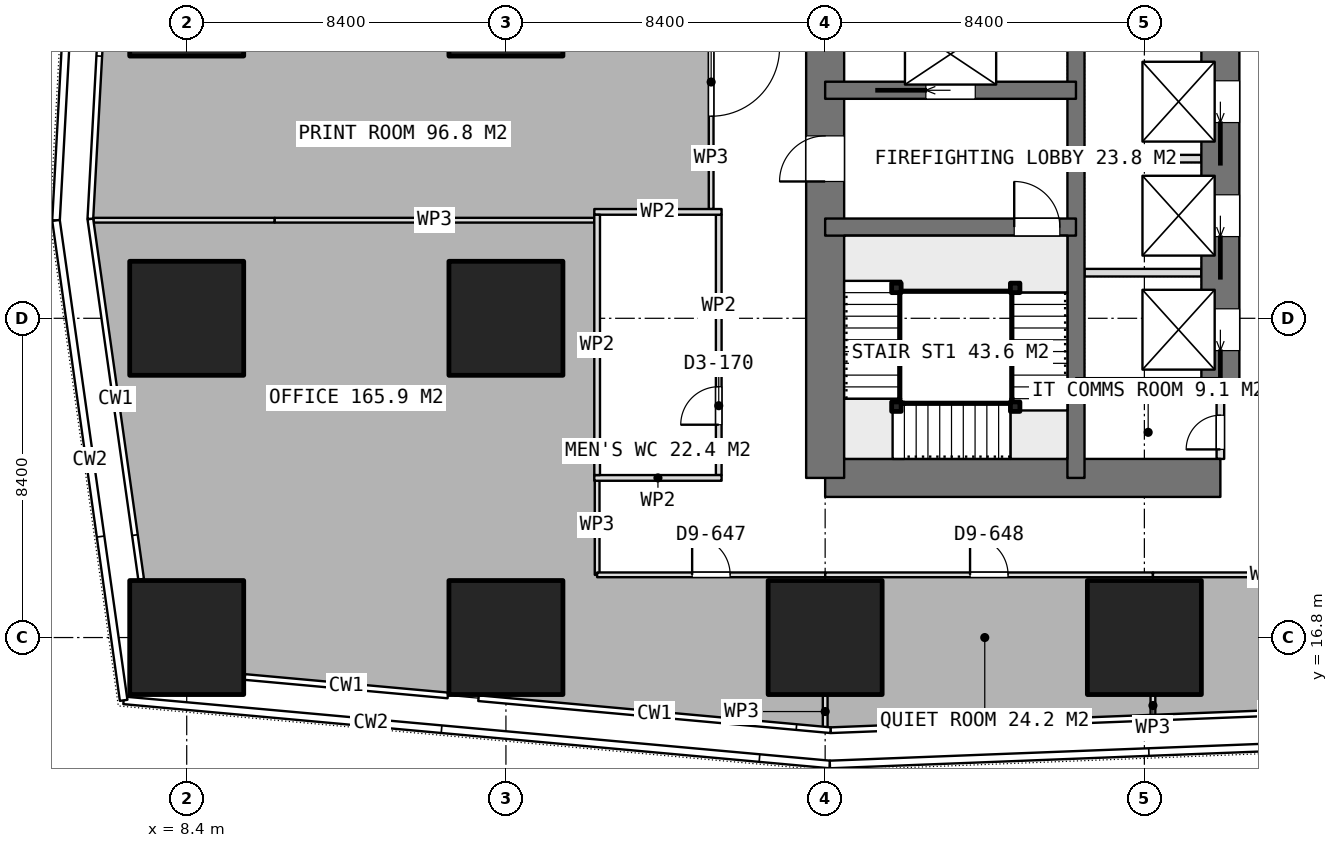
"""IFC4 building model, lengths in metres.
Left out: names, types, materials, properties, quantities, classifications, styles, units other than length and angle.
Written with IfcOpenShell. Run it as: python <this file> out.ifc"""

import sys

from ifc_helpers import new_model, si_unit, direction, frame, frame_2d, origin, origin_2d, place, context, subcontext, project, spatial, rectangle, extrude, element, fill, save


model = new_model("IFC4")
c1 = context("Model", 3, precision=1e-05, world=origin(), true_north=direction((0.0, 1.0)))
c2 = subcontext(c1, "Body", "Model", "MODEL_VIEW")
j1 = project(units=[si_unit("LENGTHUNIT", "METRE"), si_unit("PLANEANGLEUNIT", "RADIAN")], contexts=[c1])
p1 = place(None, origin())
s1 = spatial("IfcSite", under=j1, at=p1, CompositionType="ELEMENT")
p2 = place(p1, origin())
s2 = spatial("IfcBuilding", under=s1, at=p2, CompositionType="ELEMENT")
p3 = place(p2, frame((0.0, 0.0, 159.05)))
s3 = spatial("IfcBuildingStorey", under=s2, at=p3, CompositionType="ELEMENT", Elevation=159.05)
p4 = place(p3, frame((25.2, 21.0, 0.0), z_axis=(0.0, 0.0, 1.0), x_axis=(1.0, 0.0, 0.0)))
e1 = element("IfcWall", 1, at=p4, inside=s3, PredefinedType="SHEAR", context=c2, shape_type="SweptSolid", body=[
    extrude(rectangle(XDim=10.4, YDim=1.0, at=frame_2d((5.2, 0.0))), origin(), (0.0, 0.0, 1.0), 3.75),
])
p5 = place(p3, frame((25.2, 21.0, 0.0), z_axis=(0.0, 0.0, 1.0), x_axis=(0.0, 1.0, 0.0)))
e2 = element("IfcWall", 2, at=p5, inside=s3, PredefinedType="SHEAR", context=c2, shape_type="SweptSolid", body=[
    extrude(rectangle(XDim=25.2, YDim=1.0, at=frame_2d((12.6, 0.0))), origin(), (0.0, 0.0, 1.0), 3.75),
])
p6 = place(p5, frame((7.8, 0.0, 0.0)))
e3 = element("IfcOpeningElement", 3, at=p6, cuts=e2, PredefinedType="OPENING", context=c2, shape_type="SweptSolid", body=[
    extrude(rectangle(XDim=1.2, YDim=2.1, at=frame_2d((0.6, 1.05))), frame((0.0, 0.51, 0.0), z_axis=(0.0, -1.0, 0.0), x_axis=(1.0, 0.0, 0.0)), (0.0, 0.0, 1.0), 1.02),
])
p7 = place(p5, frame((14.25, 0.0, 0.0)))
e4 = element("IfcOpeningElement", 4, at=p7, cuts=e2, PredefinedType="OPENING", context=c2, shape_type="SweptSolid", body=[
    extrude(rectangle(XDim=0.9, YDim=2.1, at=frame_2d((0.45, 1.05))), frame((0.0, 0.51, 0.0), z_axis=(0.0, -1.0, 0.0), x_axis=(1.0, 0.0, 0.0)), (0.0, 0.0, 1.0), 1.02),
])
p8 = place(p5, frame((16.85, 0.0, 0.0)))
e5 = element("IfcOpeningElement", 5, at=p8, cuts=e2, PredefinedType="OPENING", context=c2, shape_type="SweptSolid", body=[
    extrude(rectangle(XDim=0.9, YDim=2.1, at=frame_2d((0.45, 1.05))), frame((0.0, 0.51, 0.0), z_axis=(0.0, -1.0, 0.0), x_axis=(1.0, 0.0, 0.0)), (0.0, 0.0, 1.0), 1.02),
])
p9 = place(p5, frame((19.025, 0.0, 0.0)))
e6 = element("IfcOpeningElement", 6, at=p9, cuts=e2, PredefinedType="OPENING", context=c2, shape_type="SweptSolid", body=[
    extrude(rectangle(XDim=1.2, YDim=2.1, at=frame_2d((0.6, 1.05))), frame((0.0, 0.51, 0.0), z_axis=(0.0, -1.0, 0.0), x_axis=(1.0, 0.0, 0.0)), (0.0, 0.0, 1.0), 1.02),
])
p10 = place(p3, frame((31.8, 21.0, 0.0), z_axis=(0.0, 0.0, 1.0), x_axis=(0.0, 1.0, 0.0)))
e7 = element("IfcWall", 7, at=p10, inside=s3, PredefinedType="SHEAR", context=c2, shape_type="SweptSolid", body=[
    extrude(rectangle(XDim=25.2, YDim=0.45, at=frame_2d((12.6, 0.0))), origin(), (0.0, 0.0, 1.0), 3.75),
])
p11 = place(p3, frame((35.6, 23.4, 0.0), z_axis=(0.0, 0.0, 1.0), x_axis=(0.0, 1.0, 0.0)))
e8 = element("IfcWall", 8, at=p11, inside=s3, PredefinedType="SHEAR", context=c2, shape_type="SweptSolid", body=[
    extrude(rectangle(XDim=18.0, YDim=1.0, at=frame_2d((9.0, 0.0))), origin(), (0.0, 0.0, 1.0), 3.75),
])
p12 = place(p11, frame((0.95, 0.0, 0.0)))
e9 = element("IfcOpeningElement", 9, at=p12, cuts=e8, PredefinedType="OPENING", context=c2, shape_type="SweptSolid", body=[
    extrude(rectangle(XDim=1.1, YDim=2.1, at=frame_2d((0.55, 1.05))), frame((0.0, 0.51, 0.0), z_axis=(0.0, -1.0, 0.0), x_axis=(1.0, 0.0, 0.0)), (0.0, 0.0, 1.0), 1.02),
])
p13 = place(p11, frame((3.95, 0.0, 0.0)))
e10 = element("IfcOpeningElement", 10, at=p13, cuts=e8, PredefinedType="OPENING", context=c2, shape_type="SweptSolid", body=[
    extrude(rectangle(XDim=1.1, YDim=2.1, at=frame_2d((0.55, 1.05))), frame((0.0, 0.51, 0.0), z_axis=(0.0, -1.0, 0.0), x_axis=(1.0, 0.0, 0.0)), (0.0, 0.0, 1.0), 1.02),
])
p14 = place(p11, frame((6.95, 0.0, 0.0)))
e11 = element("IfcOpeningElement", 11, at=p14, cuts=e8, PredefinedType="OPENING", context=c2, shape_type="SweptSolid", body=[
    extrude(rectangle(XDim=1.1, YDim=2.1, at=frame_2d((0.55, 1.05))), frame((0.0, 0.51, 0.0), z_axis=(0.0, -1.0, 0.0), x_axis=(1.0, 0.0, 0.0)), (0.0, 0.0, 1.0), 1.02),
])
p15 = place(p11, frame((9.95, 0.0, 0.0)))
e12 = element("IfcOpeningElement", 12, at=p15, cuts=e8, PredefinedType="OPENING", context=c2, shape_type="SweptSolid", body=[
    extrude(rectangle(XDim=1.1, YDim=2.1, at=frame_2d((0.55, 1.05))), frame((0.0, 0.51, 0.0), z_axis=(0.0, -1.0, 0.0), x_axis=(1.0, 0.0, 0.0)), (0.0, 0.0, 1.0), 1.02),
])
p16 = place(p11, frame((12.95, 0.0, 0.0)))
e13 = element("IfcOpeningElement", 13, at=p16, cuts=e8, PredefinedType="OPENING", context=c2, shape_type="SweptSolid", body=[
    extrude(rectangle(XDim=1.1, YDim=2.1, at=frame_2d((0.55, 1.05))), frame((0.0, 0.51, 0.0), z_axis=(0.0, -1.0, 0.0), x_axis=(1.0, 0.0, 0.0)), (0.0, 0.0, 1.0), 1.02),
])
p17 = place(p11, frame((15.95, 0.0, 0.0)))
e14 = element("IfcOpeningElement", 14, at=p17, cuts=e8, PredefinedType="OPENING", context=c2, shape_type="SweptSolid", body=[
    extrude(rectangle(XDim=1.1, YDim=2.1, at=frame_2d((0.55, 1.05))), frame((0.0, 0.51, 0.0), z_axis=(0.0, -1.0, 0.0), x_axis=(1.0, 0.0, 0.0)), (0.0, 0.0, 1.0), 1.02),
])
p18 = place(p3, frame((31.8, 23.4, 0.0), z_axis=(0.0, 0.0, 1.0), x_axis=(1.0, 0.0, 0.0)))
e15 = element("IfcWall", 15, at=p18, inside=s3, PredefinedType="SHEAR", context=c2, shape_type="SweptSolid", body=[
    extrude(rectangle(XDim=3.8, YDim=0.45, at=frame_2d((1.9, 0.0))), origin(), (0.0, 0.0, 1.0), 3.75),
])
p19 = place(p3, frame((25.2, 27.6, 0.0), z_axis=(0.0, 0.0, 1.0), x_axis=(1.0, 0.0, 0.0)))
e16 = element("IfcWall", 16, at=p19, inside=s3, PredefinedType="SHEAR", context=c2, shape_type="SweptSolid", body=[
    extrude(rectangle(XDim=6.6, YDim=0.45, at=frame_2d((3.3, 0.0))), origin(), (0.0, 0.0, 1.0), 3.75),
])
p20 = place(p19, frame((4.975, 0.0, 0.0)))
e17 = element("IfcOpeningElement", 17, at=p20, cuts=e16, PredefinedType="OPENING", context=c2, shape_type="SweptSolid", body=[
    extrude(rectangle(XDim=1.2, YDim=2.1, at=frame_2d((0.6, 1.05))), frame((0.0, 0.235, 0.0), z_axis=(0.0, -1.0, 0.0), x_axis=(1.0, 0.0, 0.0)), (0.0, 0.0, 1.0), 0.47),
])
p21 = place(p3, frame((25.2, 31.2, 0.0), z_axis=(0.0, 0.0, 1.0), x_axis=(1.0, 0.0, 0.0)))
e18 = element("IfcWall", 18, at=p21, inside=s3, PredefinedType="SHEAR", context=c2, shape_type="SweptSolid", body=[
    extrude(rectangle(XDim=6.6, YDim=0.45, at=frame_2d((3.3, 0.0))), origin(), (0.0, 0.0, 1.0), 3.75),
])
p22 = place(p21, frame((2.65, 0.0, 0.0)))
e19 = element("IfcOpeningElement", 19, at=p22, cuts=e18, PredefinedType="OPENING", context=c2, shape_type="SweptSolid", body=[
    extrude(rectangle(XDim=1.3, YDim=2.1, at=frame_2d((0.65, 1.05))), frame((0.0, 0.235, 0.0), z_axis=(0.0, -1.0, 0.0), x_axis=(1.0, 0.0, 0.0)), (0.0, 0.0, 1.0), 0.47),
])
for number, where, z_axis, x_axis in (
    (20, (8.4, 16.8, 0.0), (0.0, 0.0, 1.0), (1.0, 0.0, 0.0)),
    (21, (8.4, 25.2, 0.0), (0.0, 0.0, 1.0), (1.0, 0.0, 0.0)),
    (22, (8.4, 33.6, 0.0), (0.0, 0.0, 1.0), (1.0, 0.0, 0.0)),
    (23, (16.8, 16.8, 0.0), (0.0, 0.0, 1.0), (1.0, 0.0, 0.0)),
    (24, (16.8, 25.2, 0.0), (0.0, 0.0, 1.0), (1.0, 0.0, 0.0)),
    (25, (16.8, 33.6, 0.0), (0.0, 0.0, 1.0), (1.0, 0.0, 0.0)),
    (26, (25.2, 16.8, 0.0), (0.0, 0.0, 1.0), (1.0, 0.0, 0.0)),
    (27, (33.6, 16.8, 0.0), (0.0, 0.0, 1.0), (1.0, 0.0, 0.0)),
):
    element("IfcColumn", number, at=place(p3, frame(where, z_axis=z_axis, x_axis=x_axis)), inside=s3, PredefinedType="COLUMN", context=c2, shape_type="SweptSolid", body=[
        extrude(rectangle(XDim=3.0, YDim=3.0, at=origin_2d()), origin(), (0.0, 0.0, 1.0), 3.75),
    ])
for number, where, z_axis, x_axis in (
    (28, (32.025, 26.4, 0.0), (0.0, 0.0, 1.0), (1.0, 0.0, 0.0)),
    (29, (32.025, 29.4, 0.0), (0.0, 0.0, 1.0), (1.0, 0.0, 0.0)),
):
    element("IfcWall", number, at=place(p3, frame(where, z_axis=z_axis, x_axis=x_axis)), inside=s3, PredefinedType="PARTITIONING", context=c2, shape_type="SweptSolid", body=[
        extrude(rectangle(XDim=3.075, YDim=0.2, at=frame_2d((1.538, 0.0))), origin(), (0.0, 0.0, 1.0), 3.4),
    ])
p23 = place(p3, frame((35.6, 21.5, 0.0), z_axis=(0.0, 0.0, 1.0), x_axis=(0.0, 1.0, 0.0)))
e30 = element("IfcWall", 30, at=p23, inside=s3, PredefinedType="PARTITIONING", context=c2, shape_type="SweptSolid", body=[
    extrude(rectangle(XDim=1.675, YDim=0.2, at=frame_2d((0.837, 0.0))), origin(), (0.0, 0.0, 1.0), 3.4),
])
p24 = place(p23, frame((0.25, 0.0, 0.0)))
e31 = element("IfcOpeningElement", 31, at=p24, cuts=e30, PredefinedType="OPENING", context=c2, shape_type="SweptSolid", body=[
    extrude(rectangle(XDim=0.9, YDim=2.1, at=frame_2d((0.45, 1.05))), frame((0.0, 0.11, 0.0), z_axis=(0.0, -1.0, 0.0), x_axis=(1.0, 0.0, 0.0)), (0.0, 0.0, 1.0), 0.22),
])
for number, where, z_axis, x_axis in (
    (32, (19.125, 21.0, 0.0), (0.0, 0.0, 1.0), (1.0, 0.0, 0.0)),
    (33, (19.125, 28.0, 0.0), (0.0, 0.0, 1.0), (1.0, 0.0, 0.0)),
):
    element("IfcWall", number, at=place(p3, frame(where, z_axis=z_axis, x_axis=x_axis)), inside=s3, PredefinedType="PARTITIONING", context=c2, shape_type="SweptSolid", body=[
        extrude(rectangle(XDim=3.35, YDim=0.15, at=frame_2d((1.675, 0.0))), origin(), (0.0, 0.0, 1.0), 3.4),
    ])
p25 = place(p3, frame((19.2, 21.075, 0.0), z_axis=(0.0, 0.0, 1.0), x_axis=(0.0, 1.0, 0.0)))
e34 = element("IfcWall", 34, at=p25, inside=s3, PredefinedType="PARTITIONING", context=c2, shape_type="SweptSolid", body=[
    extrude(rectangle(XDim=6.85, YDim=0.15, at=frame_2d((3.425, 0.0))), origin(), (0.0, 0.0, 1.0), 3.4),
])
p26 = place(p3, frame((22.4, 21.075, 0.0), z_axis=(0.0, 0.0, 1.0), x_axis=(0.0, 1.0, 0.0)))
e35 = element("IfcWall", 35, at=p26, inside=s3, PredefinedType="PARTITIONING", context=c2, shape_type="SweptSolid", body=[
    extrude(rectangle(XDim=6.85, YDim=0.15, at=frame_2d((3.425, 0.0))), origin(), (0.0, 0.0, 1.0), 3.4),
])
p27 = place(p26, frame((1.325, 0.0, 0.0)))
e36 = element("IfcOpeningElement", 36, at=p27, cuts=e35, PredefinedType="OPENING", context=c2, shape_type="SweptSolid", body=[
    extrude(rectangle(XDim=1.0, YDim=2.1, at=frame_2d((0.5, 1.05))), frame((0.0, 0.085, 0.0), z_axis=(0.0, -1.0, 0.0), x_axis=(1.0, 0.0, 0.0)), (0.0, 0.0, 1.0), 0.17),
])
p28 = place(p3, frame((5.949, 27.781, 0.0), z_axis=(0.0, 0.0, 1.0), x_axis=(1.0, 0.0, 0.0)))
e37 = element("IfcWall", 37, at=p28, inside=s3, PredefinedType="PARTITIONING", context=c2, shape_type="SweptSolid", body=[
    extrude(rectangle(XDim=4.767, YDim=0.125, at=frame_2d((2.384, 0.0))), origin(), (0.0, 0.0, 1.0), 3.4),
])
p29 = place(p3, frame((10.716, 27.781, 0.0), z_axis=(0.0, 0.0, 1.0), x_axis=(1.0, 0.0, 0.0)))
e38 = element("IfcWall", 38, at=p29, inside=s3, PredefinedType="PARTITIONING", context=c2, shape_type="SweptSolid", body=[
    extrude(rectangle(XDim=8.409, YDim=0.125, at=frame_2d((4.205, 0.0))), origin(), (0.0, 0.0, 1.0), 3.4),
])
p30 = place(p3, frame((19.2, 21.075, 0.0), z_axis=(0.0, 0.0, 1.0), x_axis=(0.0, -1.0, 0.0)))
e39 = element("IfcWall", 39, at=p30, inside=s3, PredefinedType="PARTITIONING", context=c2, shape_type="SweptSolid", body=[
    extrude(rectangle(XDim=2.625, YDim=0.125, at=frame_2d((1.312, 0.0))), origin(), (0.0, 0.0, 1.0), 3.4),
])
p31 = place(p3, frame((19.2, 18.45, 0.0), z_axis=(0.0, 0.0, 1.0), x_axis=(1.0, 0.0, 0.0)))
e40 = element("IfcWall", 40, at=p31, inside=s3, PredefinedType="PARTITIONING", context=c2, shape_type="SweptSolid", body=[
    extrude(rectangle(XDim=6.001, YDim=0.125, at=frame_2d((3.0, 0.0))), origin(), (0.0, 0.0, 1.0), 3.4),
])
p32 = place(p31, frame((2.5, 0.0, 0.0)))
e41 = element("IfcOpeningElement", 41, at=p32, cuts=e40, PredefinedType="OPENING", context=c2, shape_type="SweptSolid", body=[
    extrude(rectangle(XDim=1.0, YDim=2.1, at=frame_2d((0.5, 1.05))), frame((0.0, 0.073, 0.0), z_axis=(0.0, -1.0, 0.0), x_axis=(1.0, 0.0, 0.0)), (0.0, 0.0, 1.0), 0.145),
])
p33 = place(p3, frame((25.201, 15.28, 0.0), z_axis=(0.0, 0.0, 1.0), x_axis=(0.0, -1.0, 0.0)))
e42 = element("IfcWall", 42, at=p33, inside=s3, PredefinedType="PARTITIONING", context=c2, shape_type="SweptSolid", body=[
    extrude(rectangle(XDim=0.855, YDim=0.125, at=frame_2d((0.427, 0.0))), origin(), (0.0, 0.0, 1.0), 3.4),
])
p34 = place(p3, frame((25.202, 18.45, 0.0), z_axis=(0.0, 0.0, 1.0), x_axis=(1.0, 0.0, 0.0)))
e43 = element("IfcWall", 43, at=p34, inside=s3, PredefinedType="PARTITIONING", context=c2, shape_type="SweptSolid", body=[
    extrude(rectangle(XDim=8.623, YDim=0.125, at=frame_2d((4.312, 0.0))), origin(), (0.0, 0.0, 1.0), 3.4),
])
p35 = place(p34, frame((3.811, 0.0, 0.0)))
e44 = element("IfcOpeningElement", 44, at=p35, cuts=e43, PredefinedType="OPENING", context=c2, shape_type="SweptSolid", body=[
    extrude(rectangle(XDim=1.0, YDim=2.1, at=frame_2d((0.5, 1.05))), frame((0.0, 0.073, 0.0), z_axis=(0.0, -1.0, 0.0), x_axis=(1.0, 0.0, 0.0)), (0.0, 0.0, 1.0), 0.145),
])
p36 = place(p3, frame((33.825, 15.28, 0.0), z_axis=(0.0, 0.0, 1.0), x_axis=(0.0, -1.0, 0.0)))
e45 = element("IfcWall", 45, at=p36, inside=s3, PredefinedType="PARTITIONING", context=c2, shape_type="SweptSolid", body=[
    extrude(rectangle(XDim=0.538, YDim=0.125, at=frame_2d((0.269, 0.0))), origin(), (0.0, 0.0, 1.0), 3.4),
])
p37 = place(p3, frame((33.826, 18.45, 0.0), z_axis=(0.0, 0.0, 1.0), x_axis=(1.0, 0.0, 0.0)))
e46 = element("IfcWall", 46, at=p37, inside=s3, PredefinedType="PARTITIONING", context=c2, shape_type="SweptSolid", body=[
    extrude(rectangle(XDim=15.022, YDim=0.125, at=frame_2d((7.511, 0.0))), origin(), (0.0, 0.0, 1.0), 3.4),
])
p38 = place(p37, frame((4.811, 0.0, 0.0)))
e47 = element("IfcOpeningElement", 47, at=p38, cuts=e46, PredefinedType="OPENING", context=c2, shape_type="SweptSolid", body=[
    extrude(rectangle(XDim=1.8, YDim=2.1, at=frame_2d((0.9, 1.05))), frame((0.0, 0.073, 0.0), z_axis=(0.0, -1.0, 0.0), x_axis=(1.0, 0.0, 0.0)), (0.0, 0.0, 1.0), 0.145),
])
p39 = place(p3, frame((22.2, 34.834, 0.0), z_axis=(0.0, 0.0, 1.0), x_axis=(0.0, -1.0, 0.0)))
e48 = element("IfcWall", 48, at=p39, inside=s3, PredefinedType="PARTITIONING", context=c2, shape_type="SweptSolid", body=[
    extrude(rectangle(XDim=6.759, YDim=0.125, at=frame_2d((3.379, 0.0))), origin(), (0.0, 0.0, 1.0), 3.4),
])
p40 = place(p39, frame((2.517, 0.0, 0.0)))
e49 = element("IfcOpeningElement", 49, at=p40, cuts=e48, PredefinedType="OPENING", context=c2, shape_type="SweptSolid", body=[
    extrude(rectangle(XDim=1.8, YDim=2.1, at=frame_2d((0.9, 1.05))), frame((0.0, 0.073, 0.0), z_axis=(0.0, -1.0, 0.0), x_axis=(1.0, 0.0, 0.0)), (0.0, 0.0, 1.0), 0.145),
])
for number, where, z_axis, x_axis in (
    (50, (30.2, 26.0, 0.0), (0.0, 0.0, 1.0), (1.0, 0.0, 0.0)),
    (51, (30.2, 22.875, 0.0), (0.0, 0.0, 1.0), (1.0, 0.0, 0.0)),
    (52, (27.075, 22.875, 0.0), (0.0, 0.0, 1.0), (1.0, 0.0, 0.0)),
    (53, (27.075, 26.0, 0.0), (0.0, 0.0, 1.0), (1.0, 0.0, 0.0)),
):
    element("IfcColumn", number, at=place(p3, frame(where, z_axis=z_axis, x_axis=x_axis)), inside=s3, PredefinedType="COLUMN", context=c2, shape_type="SweptSolid", body=[
        extrude(rectangle(XDim=0.25, YDim=0.25, at=origin_2d()), origin(), (0.0, 0.0, 1.0), 3.75),
    ])
p41 = place(p6, origin())
e54 = element("IfcDoor", 54, at=p41, inside=s3, OperationType="SINGLE_SWING_LEFT", PredefinedType="DOOR", context=c2, shape_type="SweptSolid", body=[
    extrude(rectangle(XDim=1.2, YDim=2.1, at=frame_2d((0.6, 1.05))), frame((0.0, 0.025, 0.0), z_axis=(0.0, -1.0, 0.0), x_axis=(1.0, 0.0, 0.0)), (0.0, 0.0, 1.0), 0.05),
])
fill(e3, e54)
p42 = place(p24, origin())
e55 = element("IfcDoor", 55, at=p42, inside=s3, OperationType="SINGLE_SWING_LEFT", PredefinedType="DOOR", context=c2, shape_type="SweptSolid", body=[
    extrude(rectangle(XDim=0.9, YDim=2.1, at=frame_2d((0.45, 1.05))), frame((0.0, 0.025, 0.0), z_axis=(0.0, -1.0, 0.0), x_axis=(1.0, 0.0, 0.0)), (0.0, 0.0, 1.0), 0.05),
])
fill(e31, e55)
p43 = place(p12, origin())
e56 = element("IfcDoor", 56, at=p43, inside=s3, OperationType="SLIDING_TO_LEFT", PredefinedType="USERDEFINED", context=c2, shape_type="SweptSolid", body=[
    extrude(rectangle(XDim=1.1, YDim=2.1, at=frame_2d((0.55, 1.05))), frame((0.0, 0.025, 0.0), z_axis=(0.0, -1.0, 0.0), x_axis=(1.0, 0.0, 0.0)), (0.0, 0.0, 1.0), 0.05),
])
fill(e9, e56)
p44 = place(p13, origin())
e57 = element("IfcDoor", 57, at=p44, inside=s3, OperationType="SLIDING_TO_LEFT", PredefinedType="USERDEFINED", context=c2, shape_type="SweptSolid", body=[
    extrude(rectangle(XDim=1.1, YDim=2.1, at=frame_2d((0.55, 1.05))), frame((0.0, 0.025, 0.0), z_axis=(0.0, -1.0, 0.0), x_axis=(1.0, 0.0, 0.0)), (0.0, 0.0, 1.0), 0.05),
])
fill(e10, e57)
p45 = place(p14, origin())
e58 = element("IfcDoor", 58, at=p45, inside=s3, OperationType="SLIDING_TO_LEFT", PredefinedType="USERDEFINED", context=c2, shape_type="SweptSolid", body=[
    extrude(rectangle(XDim=1.1, YDim=2.1, at=frame_2d((0.55, 1.05))), frame((0.0, 0.025, 0.0), z_axis=(0.0, -1.0, 0.0), x_axis=(1.0, 0.0, 0.0)), (0.0, 0.0, 1.0), 0.05),
])
fill(e11, e58)
p46 = place(p22, origin())
e59 = element("IfcDoor", 59, at=p46, inside=s3, OperationType="SLIDING_TO_LEFT", PredefinedType="USERDEFINED", context=c2, shape_type="SweptSolid", body=[
    extrude(rectangle(XDim=1.3, YDim=2.1, at=frame_2d((0.65, 1.05))), frame((0.0, 0.025, 0.0), z_axis=(0.0, -1.0, 0.0), x_axis=(1.0, 0.0, 0.0)), (0.0, 0.0, 1.0), 0.05),
])
fill(e19, e59)
p47 = place(p27, origin())
e60 = element("IfcDoor", 60, at=p47, inside=s3, OperationType="SINGLE_SWING_LEFT", PredefinedType="DOOR", context=c2, shape_type="SweptSolid", body=[
    extrude(rectangle(XDim=1.0, YDim=2.1, at=frame_2d((0.5, 1.05))), frame((0.0, 0.025, 0.0), z_axis=(0.0, -1.0, 0.0), x_axis=(1.0, 0.0, 0.0)), (0.0, 0.0, 1.0), 0.05),
])
fill(e36, e60)
p48 = place(p32, origin())
e61 = element("IfcDoor", 61, at=p48, inside=s3, OperationType="SINGLE_SWING_LEFT", PredefinedType="DOOR", context=c2, shape_type="SweptSolid", body=[
    extrude(rectangle(XDim=1.0, YDim=2.1, at=frame_2d((0.5, 1.05))), frame((0.0, 0.025, 0.0), z_axis=(0.0, -1.0, 0.0), x_axis=(1.0, 0.0, 0.0)), (0.0, 0.0, 1.0), 0.05),
])
fill(e41, e61)
p49 = place(p35, origin())
e62 = element("IfcDoor", 62, at=p49, inside=s3, OperationType="SINGLE_SWING_LEFT", PredefinedType="DOOR", context=c2, shape_type="SweptSolid", body=[
    extrude(rectangle(XDim=1.0, YDim=2.1, at=frame_2d((0.5, 1.05))), frame((0.0, 0.025, 0.0), z_axis=(0.0, -1.0, 0.0), x_axis=(1.0, 0.0, 0.0)), (0.0, 0.0, 1.0), 0.05),
])
fill(e44, e62)
p50 = place(p40, origin())
e63 = element("IfcDoor", 63, at=p50, inside=s3, OperationType="DOUBLE_DOOR_SINGLE_SWING", PredefinedType="DOOR", context=c2, shape_type="SweptSolid", body=[
    extrude(rectangle(XDim=1.8, YDim=2.1, at=frame_2d((0.9, 1.05))), frame((0.0, 0.025, 0.0), z_axis=(0.0, -1.0, 0.0), x_axis=(1.0, 0.0, 0.0)), (0.0, 0.0, 1.0), 0.05),
])
fill(e49, e63)
p51 = place(p20, origin())
e64 = element("IfcDoor", 64, at=p51, inside=s3, OperationType="SINGLE_SWING_RIGHT", PredefinedType="DOOR", context=c2, shape_type="SweptSolid", body=[
    extrude(rectangle(XDim=1.2, YDim=2.1, at=frame_2d((0.6, 1.05))), frame((0.0, 0.025, 0.0), z_axis=(0.0, -1.0, 0.0), x_axis=(1.0, 0.0, 0.0)), (0.0, 0.0, 1.0), 0.05),
])
fill(e17, e64)
save(model, sys.argv[1])
